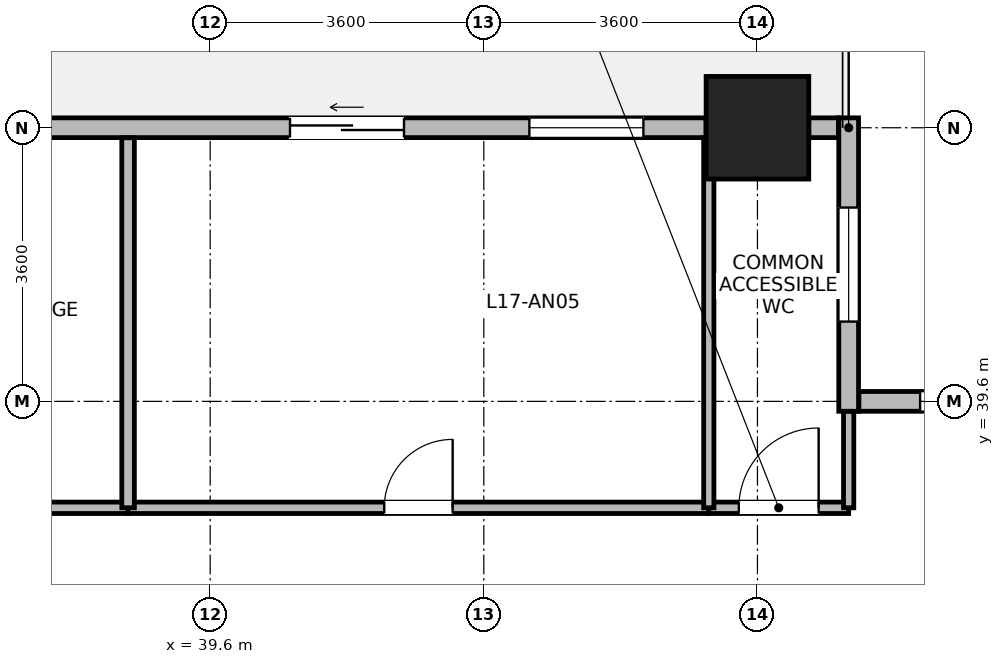
"""IFC4 building model, lengths in metres.
Left out: names, types, materials, properties, quantities, classifications, styles, units other than length and angle.
Written with IfcOpenShell. Run it as: python <this file> out.ifc"""

import sys

from ifc_helpers import new_model, si_unit, direction, frame, frame_2d, origin, origin_2d, place, context, subcontext, project, spatial, rectangle, extrude, source, transform, mapped, element, fill, save


model = new_model("IFC4")
c1 = context("Model", 3, precision=1e-05, world=origin(), true_north=direction((0.0, 1.0)))
c2 = subcontext(c1, "Body", "Model", "MODEL_VIEW")
j1 = project(units=[si_unit("LENGTHUNIT", "METRE"), si_unit("PLANEANGLEUNIT", "RADIAN")], contexts=[c1])
p1 = place(None, origin())
s1 = spatial("IfcSite", under=j1, at=p1, CompositionType="ELEMENT")
p2 = place(p1, origin())
s2 = spatial("IfcBuilding", under=s1, at=p2, CompositionType="ELEMENT")
p3 = place(p2, frame((0.0, 0.0, 69.7)))
s3 = spatial("IfcBuildingStorey", under=s2, at=p3, CompositionType="ELEMENT", Elevation=69.7)
m1 = source(origin(), c2, "Body", "SweptSolid", [
    extrude(rectangle(XDim=1.35, YDim=1.35, at=origin_2d()), origin(), (0.0, 0.0, 1.0), 3.7),
])
p4 = place(p3, frame((46.8, 43.2, 0.0), z_axis=(0.0, 0.0, 1.0), x_axis=(1.0, 0.0, 0.0)))
e1 = element("IfcColumn", 1, at=p4, inside=s3, PredefinedType="COLUMN", context=c2, shape_type="MappedRepresentation", body=[
    mapped(m1, transform((0.0, 0.0, 0.0), x_axis=(1.0, 0.0, 0.0), y_axis=(0.0, 1.0, 0.0), z_axis=(0.0, 0.0, 1.0), scale=1.0)),
])
p5 = place(p3, frame((48.135, 39.6, 0.0), z_axis=(0.0, 0.0, 1.0), x_axis=(1.0, 0.0, 0.0)))
e2 = element("IfcWall", 2, at=p5, inside=s3, PredefinedType="STANDARD", context=c2, shape_type="SweptSolid", body=[
    extrude(rectangle(XDim=9.33, YDim=0.26, at=frame_2d((4.665, 0.0))), origin(), (0.0, 0.0, 1.0), 3.32),
])
p6 = place(p5, frame((0.805, 0.0, 0.85)))
e3 = element("IfcOpeningElement", 3, at=p6, cuts=e2, PredefinedType="OPENING", context=c2, shape_type="SweptSolid", body=[
    extrude(rectangle(XDim=1.5, YDim=1.85, at=frame_2d((0.75, 0.925))), frame((0.0, 0.14, 0.0), z_axis=(0.0, -1.0, 0.0), x_axis=(1.0, 0.0, 0.0)), (0.0, 0.0, 1.0), 0.28),
])
p7 = place(p5, frame((3.915, 0.0, 0.85)))
e4 = element("IfcOpeningElement", 4, at=p7, cuts=e2, PredefinedType="OPENING", context=c2, shape_type="SweptSolid", body=[
    extrude(rectangle(XDim=1.5, YDim=1.85, at=frame_2d((0.75, 0.925))), frame((0.0, 0.14, 0.0), z_axis=(0.0, -1.0, 0.0), x_axis=(1.0, 0.0, 0.0)), (0.0, 0.0, 1.0), 0.28),
])
p8 = place(p5, frame((7.025, 0.0, 0.85)))
e5 = element("IfcOpeningElement", 5, at=p8, cuts=e2, PredefinedType="OPENING", context=c2, shape_type="SweptSolid", body=[
    extrude(rectangle(XDim=1.5, YDim=1.85, at=frame_2d((0.75, 0.925))), frame((0.0, 0.14, 0.0), z_axis=(0.0, -1.0, 0.0), x_axis=(1.0, 0.0, 0.0)), (0.0, 0.0, 1.0), 0.28),
])
p9 = place(p3, frame((48.0, 43.33, 0.0), z_axis=(0.0, 0.0, 1.0), x_axis=(0.0, -1.0, 0.0)))
e6 = element("IfcWall", 6, at=p9, inside=s3, PredefinedType="STANDARD", context=c2, shape_type="SweptSolid", body=[
    extrude(rectangle(XDim=3.86, YDim=0.26, at=frame_2d((1.93, 0.0))), origin(), (0.0, 0.0, 1.0), 3.32),
])
p10 = place(p9, frame((1.18, 0.0, 0.85)))
e7 = element("IfcOpeningElement", 7, at=p10, cuts=e6, PredefinedType="OPENING", context=c2, shape_type="SweptSolid", body=[
    extrude(rectangle(XDim=1.5, YDim=1.85, at=frame_2d((0.75, 0.925))), frame((0.0, 0.14, 0.0), z_axis=(0.0, -1.0, 0.0), x_axis=(1.0, 0.0, 0.0)), (0.0, 0.0, 1.0), 0.28),
])
p11 = place(p3, frame((47.476, 43.2, 0.0), z_axis=(0.0, 0.0, 1.0), x_axis=(1.0, 0.0, 0.0)))
e8 = element("IfcWall", 8, at=p11, inside=s3, PredefinedType="STANDARD", context=c2, shape_type="SweptSolid", body=[
    extrude(rectangle(XDim=0.389, YDim=0.26, at=frame_2d((0.194, 0.0))), origin(), (0.0, 0.0, 1.0), 3.32),
])
p12 = place(p3, frame((36.676, 43.2, 0.0), z_axis=(0.0, 0.0, 1.0), x_axis=(1.0, 0.0, 0.0)))
e9 = element("IfcWall", 9, at=p12, inside=s3, PredefinedType="STANDARD", context=c2, shape_type="SweptSolid", body=[
    extrude(rectangle(XDim=9.448, YDim=0.26, at=frame_2d((4.724, 0.0))), origin(), (0.0, 0.0, 1.0), 2.82),
])
p13 = place(p12, frame((3.974, 0.0, 0.0)))
e10 = element("IfcOpeningElement", 10, at=p13, cuts=e9, PredefinedType="OPENING", context=c2, shape_type="SweptSolid", body=[
    extrude(rectangle(XDim=1.5, YDim=2.15, at=frame_2d((0.75, 1.075))), frame((0.0, 0.14, 0.0), z_axis=(0.0, -1.0, 0.0), x_axis=(1.0, 0.0, 0.0)), (0.0, 0.0, 1.0), 0.28),
])
p14 = place(p12, frame((7.123, 0.0, 0.85)))
e11 = element("IfcOpeningElement", 11, at=p14, cuts=e9, PredefinedType="OPENING", context=c2, shape_type="SweptSolid", body=[
    extrude(rectangle(XDim=1.5, YDim=1.85, at=frame_2d((0.75, 0.925))), frame((0.0, 0.14, 0.0), z_axis=(0.0, -1.0, 0.0), x_axis=(1.0, 0.0, 0.0)), (0.0, 0.0, 1.0), 0.28),
])
p15 = place(p3, frame((30.22, 38.2, 0.0), z_axis=(0.0, 0.0, 1.0), x_axis=(1.0, 0.0, 0.0)))
e12 = element("IfcWall", 12, at=p15, inside=s3, PredefinedType="PARTITIONING", context=c2, shape_type="SweptSolid", body=[
    extrude(rectangle(XDim=8.3, YDim=0.15, at=frame_2d((4.15, 0.0))), origin(), (0.0, 0.0, 1.0), 3.32),
])
p16 = place(p15, frame((3.5, 0.0, 0.0)))
e13 = element("IfcOpeningElement", 13, at=p16, cuts=e12, PredefinedType="OPENING", context=c2, shape_type="SweptSolid", body=[
    extrude(rectangle(XDim=1.3, YDim=2.12, at=frame_2d((0.65, 1.06))), frame((0.0, 0.085, 0.0), z_axis=(0.0, -1.0, 0.0), x_axis=(1.0, 0.0, 0.0)), (0.0, 0.0, 1.0), 0.17),
])
p17 = place(p3, frame((38.52, 38.2, 0.0), z_axis=(0.0, 0.0, 1.0), x_axis=(1.0, 0.0, 0.0)))
e14 = element("IfcWall", 14, at=p17, inside=s3, PredefinedType="PARTITIONING", context=c2, shape_type="SweptSolid", body=[
    extrude(rectangle(XDim=7.64, YDim=0.15, at=frame_2d((3.82, 0.0))), origin(), (0.0, 0.0, 1.0), 3.32),
])
p18 = place(p17, frame((3.37, 0.0, 0.0)))
e15 = element("IfcOpeningElement", 15, at=p18, cuts=e14, PredefinedType="OPENING", context=c2, shape_type="SweptSolid", body=[
    extrude(rectangle(XDim=0.9, YDim=2.08, at=frame_2d((0.45, 1.04))), frame((0.0, 0.085, 0.0), z_axis=(0.0, -1.0, 0.0), x_axis=(1.0, 0.0, 0.0)), (0.0, 0.0, 1.0), 0.17),
])
p19 = place(p3, frame((46.16, 38.2, 0.0), z_axis=(0.0, 0.0, 1.0), x_axis=(1.0, 0.0, 0.0)))
e16 = element("IfcWall", 16, at=p19, inside=s3, PredefinedType="PARTITIONING", context=c2, shape_type="SweptSolid", body=[
    extrude(rectangle(XDim=1.84, YDim=0.15, at=frame_2d((0.92, 0.0))), origin(), (0.0, 0.0, 1.0), 3.32),
])
p20 = place(p19, frame((0.395, 0.0, 0.0)))
e17 = element("IfcOpeningElement", 17, at=p20, cuts=e16, PredefinedType="OPENING", context=c2, shape_type="SweptSolid", body=[
    extrude(rectangle(XDim=1.05, YDim=2.12, at=frame_2d((0.525, 1.06))), frame((0.0, 0.085, 0.0), z_axis=(0.0, -1.0, 0.0), x_axis=(1.0, 0.0, 0.0)), (0.0, 0.0, 1.0), 0.17),
])
p21 = place(p3, frame((38.52, 38.2, 0.0), z_axis=(0.0, 0.0, 1.0), x_axis=(0.0, 1.0, 0.0)))
e18 = element("IfcWall", 18, at=p21, inside=s3, PredefinedType="PARTITIONING", context=c2, shape_type="SweptSolid", body=[
    extrude(rectangle(XDim=4.868, YDim=0.165, at=frame_2d((2.434, 0.0))), origin(), (0.0, 0.0, 1.0), 3.32),
])
p22 = place(p3, frame((46.16, 38.2, 0.0), z_axis=(0.0, 0.0, 1.0), x_axis=(0.0, 1.0, 0.0)))
e19 = element("IfcWall", 19, at=p22, inside=s3, PredefinedType="PARTITIONING", context=c2, shape_type="SweptSolid", body=[
    extrude(rectangle(XDim=4.868, YDim=0.135, at=frame_2d((2.434, 0.0))), origin(), (0.0, 0.0, 1.0), 3.32),
])
p23 = place(p3, frame((48.0, 38.2, 0.0), z_axis=(0.0, 0.0, 1.0), x_axis=(0.0, 1.0, 0.0)))
e20 = element("IfcWall", 20, at=p23, inside=s3, PredefinedType="PARTITIONING", context=c2, shape_type="SweptSolid", body=[
    extrude(rectangle(XDim=1.268, YDim=0.135, at=frame_2d((0.634, 0.0))), origin(), (0.0, 0.0, 1.0), 3.32),
])
p24 = place(p6, origin())
e21 = element("IfcWindow", 21, at=p24, inside=s3, PartitioningType="SINGLE_PANEL", PredefinedType="WINDOW", context=c2, shape_type="SweptSolid", body=[
    extrude(rectangle(XDim=1.5, YDim=1.85, at=frame_2d((0.75, 0.925))), frame((0.0, 0.03, 0.0), z_axis=(0.0, -1.0, 0.0), x_axis=(1.0, 0.0, 0.0)), (0.0, 0.0, 1.0), 0.06),
])
fill(e3, e21)
p25 = place(p10, origin())
e22 = element("IfcWindow", 22, at=p25, inside=s3, PartitioningType="SINGLE_PANEL", PredefinedType="WINDOW", context=c2, shape_type="SweptSolid", body=[
    extrude(rectangle(XDim=1.5, YDim=1.85, at=frame_2d((0.75, 0.925))), frame((0.0, 0.03, 0.0), z_axis=(0.0, -1.0, 0.0), x_axis=(1.0, 0.0, 0.0)), (0.0, 0.0, 1.0), 0.06),
])
fill(e7, e22)
p26 = place(p13, origin())
e23 = element("IfcDoor", 23, at=p26, inside=s3, OperationType="SLIDING_TO_LEFT", PredefinedType="DOOR", context=c2, shape_type="SweptSolid", body=[
    extrude(rectangle(XDim=1.5, YDim=2.15, at=frame_2d((0.75, 1.075))), frame((0.0, 0.025, 0.0), z_axis=(0.0, -1.0, 0.0), x_axis=(1.0, 0.0, 0.0)), (0.0, 0.0, 1.0), 0.05),
])
fill(e10, e23)
p27 = place(p14, origin())
e24 = element("IfcWindow", 24, at=p27, inside=s3, PartitioningType="SINGLE_PANEL", PredefinedType="WINDOW", context=c2, shape_type="SweptSolid", body=[
    extrude(rectangle(XDim=1.5, YDim=1.85, at=frame_2d((0.75, 0.925))), frame((0.0, 0.03, 0.0), z_axis=(0.0, -1.0, 0.0), x_axis=(1.0, 0.0, 0.0)), (0.0, 0.0, 1.0), 0.06),
])
fill(e11, e24)
p28 = place(p18, origin())
e25 = element("IfcDoor", 25, at=p28, inside=s3, OperationType="SINGLE_SWING_RIGHT", PredefinedType="DOOR", context=c2, shape_type="SweptSolid", body=[
    extrude(rectangle(XDim=0.9, YDim=2.08, at=frame_2d((0.45, 1.04))), frame((0.0, 0.025, 0.0), z_axis=(0.0, -1.0, 0.0), x_axis=(1.0, 0.0, 0.0)), (0.0, 0.0, 1.0), 0.05),
])
fill(e15, e25)
p29 = place(p20, origin())
e26 = element("IfcDoor", 26, at=p29, inside=s3, OperationType="SINGLE_SWING_RIGHT", PredefinedType="DOOR", context=c2, shape_type="SweptSolid", body=[
    extrude(rectangle(XDim=1.05, YDim=2.12, at=frame_2d((0.525, 1.06))), frame((0.0, 0.025, 0.0), z_axis=(0.0, -1.0, 0.0), x_axis=(1.0, 0.0, 0.0)), (0.0, 0.0, 1.0), 0.05),
])
fill(e17, e26)
save(model, sys.argv[1])
